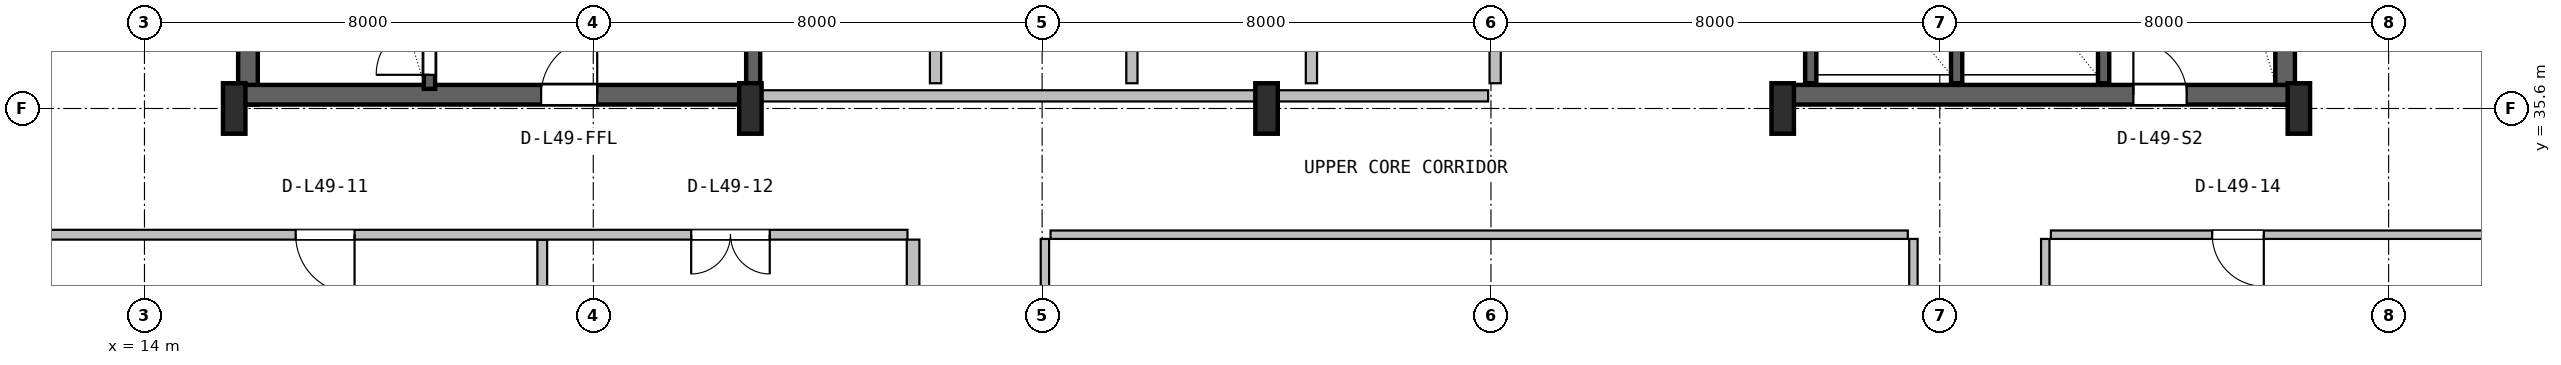
"""IFC4 building model, lengths in metres.
Left out: names, types, materials, properties, quantities, classifications, styles, units other than length and angle.
Written with IfcOpenShell. Run it as: python <this file> out.ifc"""

import sys

from ifc_helpers import new_model, si_unit, direction, frame, frame_2d, origin, origin_2d, place, context, subcontext, project, spatial, rectangle, i_section, extrude, source, transform, mapped, element, fill, save


model = new_model("IFC4")
c1 = context("Model", 3, precision=1e-05, world=origin(), true_north=direction((0.0, 1.0)))
c2 = subcontext(c1, "Body", "Model", "MODEL_VIEW")
j1 = project(units=[si_unit("LENGTHUNIT", "METRE"), si_unit("PLANEANGLEUNIT", "RADIAN")], contexts=[c1])
p1 = place(None, origin())
s1 = spatial("IfcSite", under=j1, at=p1, CompositionType="ELEMENT")
p2 = place(p1, origin())
s2 = spatial("IfcBuilding", under=s1, at=p2, CompositionType="ELEMENT")
p3 = place(p2, frame((0.0, 0.0, 199.8)))
s3 = spatial("IfcBuildingStorey", under=s2, at=p3, CompositionType="ELEMENT", Elevation=199.8)
for number, where, z_axis, x_axis in (
    (1, (15.845, 35.67, 0.0), (0.0, 0.0, 1.0), (0.0, 1.0, 0.0)),
    (2, (52.155, 35.67, 0.0), (0.0, 0.0, 1.0), (0.0, 1.0, 0.0)),
):
    element("IfcWall", number, at=place(p3, frame(where, z_axis=z_axis, x_axis=x_axis)), inside=s3, PredefinedType="SHEAR", context=c2, shape_type="SweptSolid", body=[
        extrude(rectangle(XDim=11.13, YDim=0.35, at=frame_2d((5.565, 0.0))), origin(), (0.0, 0.0, 1.0), 3.55),
    ])
p4 = place(p3, frame((15.67, 35.845, 0.0), z_axis=(0.0, 0.0, 1.0), x_axis=(1.0, 0.0, 0.0)))
e3 = element("IfcWall", 3, at=p4, inside=s3, PredefinedType="SHEAR", context=c2, shape_type="SweptSolid", body=[
    extrude(rectangle(XDim=9.13, YDim=0.35, at=frame_2d((4.565, 0.0))), origin(), (0.0, 0.0, 1.0), 3.55),
])
p5 = place(p4, frame((5.4, 0.0, 0.0)))
e4 = element("IfcOpeningElement", 4, at=p5, cuts=e3, PredefinedType="OPENING", context=c2, shape_type="SweptSolid", body=[
    extrude(rectangle(XDim=1.0, YDim=2.1, at=frame_2d((0.5, 1.05))), frame((0.0, 0.185, 0.0), z_axis=(0.0, -1.0, 0.0), x_axis=(1.0, 0.0, 0.0)), (0.0, 0.0, 1.0), 0.37),
])
p6 = place(p3, frame((43.2, 35.845, 0.0), z_axis=(0.0, 0.0, 1.0), x_axis=(1.0, 0.0, 0.0)))
e5 = element("IfcWall", 5, at=p6, inside=s3, PredefinedType="SHEAR", context=c2, shape_type="SweptSolid", body=[
    extrude(rectangle(XDim=9.13, YDim=0.35, at=frame_2d((4.565, 0.0))), origin(), (0.0, 0.0, 1.0), 3.55),
])
p7 = place(p6, frame((6.25, 0.0, 0.0)))
e6 = element("IfcOpeningElement", 6, at=p7, cuts=e5, PredefinedType="OPENING", context=c2, shape_type="SweptSolid", body=[
    extrude(rectangle(XDim=0.95, YDim=2.1, at=frame_2d((0.475, 1.05))), frame((0.0, 0.185, 0.0), z_axis=(0.0, -1.0, 0.0), x_axis=(1.0, 0.0, 0.0)), (0.0, 0.0, 1.0), 0.37),
])
m1 = source(origin(), c2, "Body", "SweptSolid", [
    extrude(i_section(OverallWidth=0.4, OverallDepth=0.9, WebThickness=0.016, FlangeThickness=0.028, FilletRadius=0.016, at=origin_2d()), origin(), (0.0, 0.0, 1.0), 3.8),
])
for number, where, z_axis, x_axis in (
    (7, (15.6, 35.6, 0.0), (0.0, 0.0, 1.0), (1.0, 0.0, 0.0)),
    (8, (24.8, 35.6, 0.0), (0.0, 0.0, 1.0), (1.0, 0.0, 0.0)),
    (9, (34.0, 35.6, 0.0), (0.0, 0.0, 1.0), (1.0, 0.0, 0.0)),
    (10, (43.2, 35.6, 0.0), (0.0, 0.0, 1.0), (1.0, 0.0, 0.0)),
    (11, (52.4, 35.6, 0.0), (0.0, 0.0, 1.0), (1.0, 0.0, 0.0)),
):
    element("IfcColumn", number, at=place(p3, frame(where, z_axis=z_axis, x_axis=x_axis)), inside=s3, PredefinedType="COLUMN", context=c2, shape_type="MappedRepresentation", body=[
        mapped(m1, transform((0.0, 0.0, 0.0), x_axis=(1.0, 0.0, 0.0), y_axis=(0.0, 1.0, 0.0), z_axis=(0.0, 0.0, 1.0), scale=1.0)),
    ])
p8 = place(p3, frame((19.08, 35.95, 0.0), z_axis=(0.0, 0.0, 1.0), x_axis=(0.0, 1.0, 0.0)))
e12 = element("IfcWall", 12, at=p8, inside=s3, PredefinedType="SHEAR", context=c2, shape_type="SweptSolid", body=[
    extrude(rectangle(XDim=9.65, YDim=0.2, at=frame_2d((4.825, 0.0))), origin(), (0.0, 0.0, 1.0), 3.55),
])
p9 = place(p8, frame((0.25, 0.0, 0.0)))
e13 = element("IfcOpeningElement", 13, at=p9, cuts=e12, PredefinedType="OPENING", context=c2, shape_type="SweptSolid", body=[
    extrude(rectangle(XDim=0.95, YDim=2.1, at=frame_2d((0.475, 1.05))), frame((0.0, 0.11, 0.0), z_axis=(0.0, -1.0, 0.0), x_axis=(1.0, 0.0, 0.0)), (0.0, 0.0, 1.0), 0.22),
])
p10 = place(p3, frame((24.85, 36.05, 0.0), z_axis=(0.0, 0.0, 1.0), x_axis=(0.0, 1.0, 0.0)))
e14 = element("IfcWall", 14, at=p10, inside=s3, PredefinedType="SHEAR", context=c2, shape_type="SweptSolid", body=[
    extrude(rectangle(XDim=10.45, YDim=0.25, at=frame_2d((5.225, 0.0))), origin(), (0.0, 0.0, 1.0), 3.55),
])
p11 = place(p3, frame((48.92, 36.05, 0.0), z_axis=(0.0, 0.0, 1.0), x_axis=(0.0, 1.0, 0.0)))
e15 = element("IfcWall", 15, at=p11, inside=s3, PredefinedType="SHEAR", context=c2, shape_type="SweptSolid", body=[
    extrude(rectangle(XDim=10.5, YDim=0.2, at=frame_2d((5.25, 0.0))), origin(), (0.0, 0.0, 1.0), 3.55),
])
for number, where, z_axis, x_axis in (
    (16, (43.7, 36.05, 0.0), (0.0, 0.0, 1.0), (0.0, 1.0, 0.0)),
    (17, (46.3, 36.05, 0.0), (0.0, 0.0, 1.0), (0.0, 1.0, 0.0)),
):
    element("IfcWall", number, at=place(p3, frame(where, z_axis=z_axis, x_axis=x_axis)), inside=s3, PredefinedType="SHEAR", context=c2, shape_type="SweptSolid", body=[
        extrude(rectangle(XDim=3.05, YDim=0.2, at=frame_2d((1.525, 0.0))), origin(), (0.0, 0.0, 1.0), 3.55),
    ])
p12 = place(p3, frame((25.0, 35.825, 0.0), z_axis=(0.0, 0.0, 1.0), x_axis=(1.0, 0.0, 0.0)))
e18 = element("IfcWall", 18, at=p12, inside=s3, PredefinedType="SOLIDWALL", context=c2, shape_type="SweptSolid", body=[
    extrude(rectangle(XDim=12.95, YDim=0.2, at=frame_2d((6.475, 0.0))), origin(), (0.0, 0.0, 1.0), 2.575),
])
for number, where, z_axis, x_axis in (
    (19, (28.1, 36.05, 0.0), (0.0, 0.0, 1.0), (0.0, 1.0, 0.0)),
    (20, (31.6, 36.05, 0.0), (0.0, 0.0, 1.0), (0.0, 1.0, 0.0)),
):
    element("IfcWall", number, at=place(p3, frame(where, z_axis=z_axis, x_axis=x_axis)), inside=s3, PredefinedType="PLUMBINGWALL", context=c2, shape_type="SweptSolid", body=[
        extrude(rectangle(XDim=3.1, YDim=0.2, at=frame_2d((1.55, 0.0))), origin(), (0.0, 0.0, 1.0), 3.53),
    ])
for number, where, z_axis, x_axis in (
    (21, (34.8, 36.05, 0.0), (0.0, 0.0, 1.0), (0.0, 1.0, 0.0)),
    (22, (38.075, 36.05, 0.0), (0.0, 0.0, 1.0), (0.0, 1.0, 0.0)),
):
    element("IfcWall", number, at=place(p3, frame(where, z_axis=z_axis, x_axis=x_axis)), inside=s3, PredefinedType="SOLIDWALL", context=c2, shape_type="SweptSolid", body=[
        extrude(rectangle(XDim=3.1, YDim=0.2, at=frame_2d((1.55, 0.0))), origin(), (0.0, 0.0, 1.0), 3.53),
    ])
p13 = place(p3, frame((21.09, 27.262, 0.0), z_axis=(0.0, 0.0, 1.0), x_axis=(0.0, 1.0, 0.0)))
e23 = element("IfcWall", 23, at=p13, inside=s3, PredefinedType="PARTITIONING", context=c2, shape_type="SweptSolid", body=[
    extrude(rectangle(XDim=6.001, YDim=0.175, at=frame_2d((3.0, 0.0))), origin(), (0.0, 0.0, 1.0), 3.222),
])
p14 = place(p3, frame((9.68, 33.35, 0.0), z_axis=(0.0, 0.0, 1.0), x_axis=(1.0, 0.0, 0.0)))
e24 = element("IfcWall", 24, at=p14, inside=s3, PredefinedType="PARTITIONING", context=c2, shape_type="SweptSolid", body=[
    extrude(rectangle(XDim=17.92, YDim=0.175, at=frame_2d((8.96, 0.0))), origin(), (0.0, 0.0, 1.0), 2.908),
])
p15 = place(p14, frame((7.015, 0.0, 0.0)))
e25 = element("IfcOpeningElement", 25, at=p15, cuts=e24, PredefinedType="OPENING", context=c2, shape_type="SweptSolid", body=[
    extrude(rectangle(XDim=1.05, YDim=2.1, at=frame_2d((0.525, 1.05))), frame((0.0, 0.098, 0.0), z_axis=(0.0, -1.0, 0.0), x_axis=(1.0, 0.0, 0.0)), (0.0, 0.0, 1.0), 0.195),
])
p16 = place(p14, frame((14.065, 0.0, 0.0)))
e26 = element("IfcOpeningElement", 26, at=p16, cuts=e24, PredefinedType="OPENING", context=c2, shape_type="SweptSolid", body=[
    extrude(rectangle(XDim=1.4, YDim=2.12, at=frame_2d((0.7, 1.06))), frame((0.0, 0.098, 0.0), z_axis=(0.0, -1.0, 0.0), x_axis=(1.0, 0.0, 0.0)), (0.0, 0.0, 1.0), 0.195),
])
p17 = place(p3, frame((27.7, 27.262, 0.0), z_axis=(0.0, 0.0, 1.0), x_axis=(0.0, 1.0, 0.0)))
e27 = element("IfcWall", 27, at=p17, inside=s3, PredefinedType="PARTITIONING", context=c2, shape_type="SweptSolid", body=[
    extrude(rectangle(XDim=6.001, YDim=0.225, at=frame_2d((3.0, 0.0))), origin(), (0.0, 0.0, 1.0), 3.222),
])
p18 = place(p3, frame((45.53, 29.575, 0.0), z_axis=(0.0, 0.0, 1.0), x_axis=(0.0, 1.0, 0.0)))
e28 = element("IfcWall", 28, at=p18, inside=s3, PredefinedType="PARTITIONING", context=c2, shape_type="SweptSolid", body=[
    extrude(rectangle(XDim=3.7, YDim=0.15, at=frame_2d((1.85, 0.0))), origin(), (0.0, 0.0, 1.0), 3.53),
])
p19 = place(p3, frame((30.15, 33.35, 0.0), z_axis=(0.0, 0.0, 1.0), x_axis=(1.0, 0.0, 0.0)))
e29 = element("IfcWall", 29, at=p19, inside=s3, PredefinedType="PARTITIONING", context=c2, shape_type="SweptSolid", body=[
    extrude(rectangle(XDim=15.28, YDim=0.15, at=frame_2d((7.64, 0.0))), origin(), (0.0, 0.0, 1.0), 2.908),
])
p20 = place(p3, frame((30.05, 29.575, 0.0), z_axis=(0.0, 0.0, 1.0), x_axis=(0.0, 1.0, 0.0)))
e30 = element("IfcWall", 30, at=p20, inside=s3, PredefinedType="PARTITIONING", context=c2, shape_type="SweptSolid", body=[
    extrude(rectangle(XDim=3.7, YDim=0.15, at=frame_2d((1.85, 0.0))), origin(), (0.0, 0.0, 1.0), 3.53),
])
p21 = place(p3, frame((47.98, 33.35, 0.0), z_axis=(0.0, 0.0, 1.0), x_axis=(1.0, 0.0, 0.0)))
e31 = element("IfcWall", 31, at=p21, inside=s3, PredefinedType="PARTITIONING", context=c2, shape_type="SweptSolid", body=[
    extrude(rectangle(XDim=10.34, YDim=0.15, at=frame_2d((5.17, 0.0))), origin(), (0.0, 0.0, 1.0), 3.171),
])
p22 = place(p21, frame((2.875, 0.0, 0.0)))
e32 = element("IfcOpeningElement", 32, at=p22, cuts=e31, PredefinedType="OPENING", context=c2, shape_type="SweptSolid", body=[
    extrude(rectangle(XDim=0.92, YDim=2.08, at=frame_2d((0.46, 1.04))), frame((0.0, 0.085, 0.0), z_axis=(0.0, -1.0, 0.0), x_axis=(1.0, 0.0, 0.0)), (0.0, 0.0, 1.0), 0.17),
])
p23 = place(p3, frame((47.88, 27.262, 0.0), z_axis=(0.0, 0.0, 1.0), x_axis=(0.0, 1.0, 0.0)))
e33 = element("IfcWall", 33, at=p23, inside=s3, PredefinedType="PARTITIONING", context=c2, shape_type="SweptSolid", body=[
    extrude(rectangle(XDim=6.013, YDim=0.15, at=frame_2d((3.006, 0.0))), origin(), (0.0, 0.0, 1.0), 3.222),
])
m2 = source(origin(), c2, "Body", "SweptSolid", [
    extrude(rectangle(XDim=0.95, YDim=2.1, at=frame_2d((0.475, 1.05))), frame((0.0, 0.025, 0.0), z_axis=(0.0, -1.0, 0.0), x_axis=(1.0, 0.0, 0.0)), (0.0, 0.0, 1.0), 0.05),
])
p24 = place(p9, origin())
e34 = element("IfcDoor", 34, at=p24, inside=s3, OperationType="SINGLE_SWING_LEFT", PredefinedType="DOOR", context=c2, shape_type="MappedRepresentation", body=[
    mapped(m2, transform((0.0, 0.0, 0.0), x_axis=(1.0, 0.0, 0.0), y_axis=(0.0, 1.0, 0.0), z_axis=(0.0, 0.0, 1.0), scale=1.0)),
])
fill(e13, e34)
m3 = source(origin(), c2, "Body", "SweptSolid", [
    extrude(rectangle(XDim=1.0, YDim=2.1, at=frame_2d((0.5, 1.05))), frame((0.0, 0.025, 0.0), z_axis=(0.0, -1.0, 0.0), x_axis=(1.0, 0.0, 0.0)), (0.0, 0.0, 1.0), 0.05),
])
p25 = place(p5, origin())
e35 = element("IfcDoor", 35, at=p25, inside=s3, OperationType="SINGLE_SWING_RIGHT", PredefinedType="DOOR", context=c2, shape_type="MappedRepresentation", body=[
    mapped(m3, transform((0.0, 0.0, 0.0), x_axis=(1.0, 0.0, 0.0), y_axis=(0.0, 1.0, 0.0), z_axis=(0.0, 0.0, 1.0), scale=1.0)),
])
fill(e4, e35)
p26 = place(p7, origin())
e36 = element("IfcDoor", 36, at=p26, inside=s3, OperationType="SINGLE_SWING_LEFT", PredefinedType="DOOR", context=c2, shape_type="MappedRepresentation", body=[
    mapped(m2, transform((0.0, 0.0, 0.0), x_axis=(1.0, 0.0, 0.0), y_axis=(0.0, 1.0, 0.0), z_axis=(0.0, 0.0, 1.0), scale=1.0)),
])
fill(e6, e36)
m4 = source(origin(), c2, "Body", "SweptSolid", [
    extrude(rectangle(XDim=1.05, YDim=2.1, at=frame_2d((0.525, 1.05))), frame((0.0, 0.025, 0.0), z_axis=(0.0, -1.0, 0.0), x_axis=(1.0, 0.0, 0.0)), (0.0, 0.0, 1.0), 0.05),
])
p27 = place(p15, frame((1.05, 0.0, 0.0), z_axis=(0.0, 0.0, 1.0), x_axis=(-1.0, 0.0, 0.0)))
e37 = element("IfcDoor", 37, at=p27, inside=s3, OperationType="SINGLE_SWING_RIGHT", PredefinedType="DOOR", context=c2, shape_type="MappedRepresentation", body=[
    mapped(m4, transform((0.0, 0.0, 0.0), x_axis=(1.0, 0.0, 0.0), y_axis=(0.0, 1.0, 0.0), z_axis=(0.0, 0.0, 1.0), scale=1.0)),
])
fill(e25, e37)
m5 = source(origin(), c2, "Body", "SweptSolid", [
    extrude(rectangle(XDim=1.4, YDim=2.12, at=frame_2d((0.7, 1.06))), frame((0.0, 0.025, 0.0), z_axis=(0.0, -1.0, 0.0), x_axis=(1.0, 0.0, 0.0)), (0.0, 0.0, 1.0), 0.05),
])
p28 = place(p16, frame((1.4, 0.0, 0.0), z_axis=(0.0, 0.0, 1.0), x_axis=(-1.0, 0.0, 0.0)))
e38 = element("IfcDoor", 38, at=p28, inside=s3, OperationType="DOUBLE_DOOR_SINGLE_SWING", PredefinedType="DOOR", context=c2, shape_type="MappedRepresentation", body=[
    mapped(m5, transform((0.0, 0.0, 0.0), x_axis=(1.0, 0.0, 0.0), y_axis=(0.0, 1.0, 0.0), z_axis=(0.0, 0.0, 1.0), scale=1.0)),
])
fill(e26, e38)
m6 = source(origin(), c2, "Body", "SweptSolid", [
    extrude(rectangle(XDim=0.92, YDim=2.08, at=frame_2d((0.46, 1.04))), frame((0.0, 0.025, 0.0), z_axis=(0.0, -1.0, 0.0), x_axis=(1.0, 0.0, 0.0)), (0.0, 0.0, 1.0), 0.05),
])
p29 = place(p22, frame((0.92, 0.0, 0.0), z_axis=(0.0, 0.0, 1.0), x_axis=(-1.0, 0.0, 0.0)))
e39 = element("IfcDoor", 39, at=p29, inside=s3, OperationType="SINGLE_SWING_RIGHT", PredefinedType="DOOR", context=c2, shape_type="MappedRepresentation", body=[
    mapped(m6, transform((0.0, 0.0, 0.0), x_axis=(1.0, 0.0, 0.0), y_axis=(0.0, 1.0, 0.0), z_axis=(0.0, 0.0, 1.0), scale=1.0)),
])
fill(e32, e39)
save(model, sys.argv[1])
